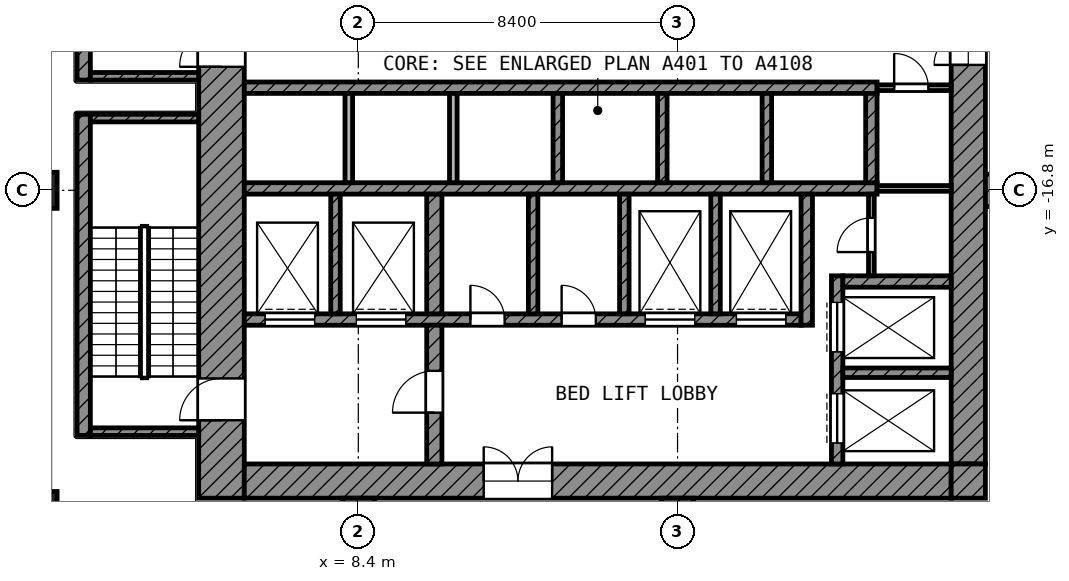
"""IFC4 building model, lengths in metres.
Left out: names, types, materials, properties, quantities, classifications, styles, units other than length and angle.
Written with IfcOpenShell. Run it as: python <this file> out.ifc"""

import sys

from ifc_helpers import new_model, si_unit, direction, frame, frame_2d, origin, origin_2d, place, context, subcontext, project, spatial, rectangle, extrude, element, fill, save


model = new_model("IFC4")
c1 = context("Model", 3, precision=1e-05, world=origin(), true_north=direction((0.0, 1.0)))
c2 = subcontext(c1, "Body", "Model", "MODEL_VIEW")
j1 = project(units=[si_unit("LENGTHUNIT", "METRE"), si_unit("PLANEANGLEUNIT", "RADIAN")], contexts=[c1])
p1 = place(None, origin())
s1 = spatial("IfcSite", under=j1, at=p1, CompositionType="ELEMENT")
p2 = place(p1, origin())
s2 = spatial("IfcBuilding", under=s1, at=p2, CompositionType="ELEMENT")
p3 = place(p2, frame((0.0, 0.0, 153.4)))
s3 = spatial("IfcBuildingStorey", under=s2, at=p3, CompositionType="ELEMENT", Elevation=153.4)
for number, where, z_axis, x_axis in (
    (1, (0.0, -16.8, 0.0), (0.0, 0.0, 1.0), (1.0, 0.0, 0.0)),
    (2, (0.0, -25.2, 0.0), (0.0, 0.0, 1.0), (1.0, 0.0, 0.0)),
):
    element("IfcColumn", number, at=place(p3, frame(where, z_axis=z_axis, x_axis=x_axis)), inside=s3, PredefinedType="COLUMN", context=c2, shape_type="SweptSolid", body=[
        extrude(rectangle(XDim=0.95, YDim=0.95, at=origin_2d()), origin(), (0.0, 0.0, 1.0), 5.0),
    ])
for number, where, z_axis, x_axis in (
    (3, (24.9, -16.8, 0.0), (0.0, 0.0, 1.0), (1.0, 0.0, 0.0)),
    (4, (8.4, -24.9, 0.0), (0.0, 0.0, 1.0), (0.0, -1.0, 0.0)),
    (5, (16.8, -24.9, 0.0), (0.0, 0.0, 1.0), (0.0, -1.0, 0.0)),
):
    element("IfcWall", number, at=place(p3, frame(where, z_axis=z_axis, x_axis=x_axis)), inside=s3, PredefinedType="SHEAR", context=c2, shape_type="SweptSolid", body=[
        extrude(rectangle(XDim=8.2, YDim=0.85, at=frame_2d((4.1, 0.0))), origin(), (0.0, 0.0, 1.0), 4.4),
    ])
p4 = place(p3, frame((4.8, -24.9, 0.0), z_axis=(0.0, 0.0, 1.0), x_axis=(0.0, 1.0, 0.0)))
e6 = element("IfcWall", 6, at=p4, inside=s3, PredefinedType="SHEAR", context=c2, shape_type="SweptSolid", body=[
    extrude(rectangle(XDim=19.5, YDim=1.2, at=frame_2d((9.75, 0.0))), origin(), (0.0, 0.0, 1.0), 4.4),
])
p5 = place(p4, frame((11.35, 0.0, 0.0)))
e7 = element("IfcOpeningElement", 7, at=p5, cuts=e6, PredefinedType="OPENING", context=c2, shape_type="SweptSolid", body=[
    extrude(rectangle(XDim=1.1, YDim=2.1, at=frame_2d((0.55, 1.05))), frame((0.0, 0.61, 0.0), z_axis=(0.0, -1.0, 0.0), x_axis=(1.0, 0.0, 0.0)), (0.0, 0.0, 1.0), 1.22),
])
p6 = place(p4, frame((2.05, 0.0, 0.0)))
e8 = element("IfcOpeningElement", 8, at=p6, cuts=e6, PredefinedType="OPENING", context=c2, shape_type="SweptSolid", body=[
    extrude(rectangle(XDim=1.1, YDim=2.1, at=frame_2d((0.55, 1.05))), frame((0.0, 0.61, 0.0), z_axis=(0.0, -1.0, 0.0), x_axis=(1.0, 0.0, 0.0)), (0.0, 0.0, 1.0), 1.22),
])
p7 = place(p3, frame((24.45, -24.0, 0.0), z_axis=(0.0, 0.0, 1.0), x_axis=(0.0, 1.0, 0.0)))
e9 = element("IfcWall", 9, at=p7, inside=s3, PredefinedType="SHEAR", context=c2, shape_type="SweptSolid", body=[
    extrude(rectangle(XDim=18.6, YDim=0.9, at=frame_2d((9.3, 0.0))), origin(), (0.0, 0.0, 1.0), 4.4),
])
p8 = place(p7, frame((10.5, 0.0, 0.0)))
e10 = element("IfcOpeningElement", 10, at=p8, cuts=e9, PredefinedType="OPENING", context=c2, shape_type="SweptSolid", body=[
    extrude(rectangle(XDim=1.8, YDim=2.1, at=frame_2d((0.9, 1.05))), frame((0.0, 0.46, 0.0), z_axis=(0.0, -1.0, 0.0), x_axis=(1.0, 0.0, 0.0)), (0.0, 0.0, 1.0), 0.92),
])
p9 = place(p3, frame((5.4, -24.45, 0.0), z_axis=(0.0, 0.0, 1.0), x_axis=(1.0, 0.0, 0.0)))
e11 = element("IfcWall", 11, at=p9, inside=s3, PredefinedType="SHEAR", context=c2, shape_type="SweptSolid", body=[
    extrude(rectangle(XDim=18.6, YDim=0.9, at=frame_2d((9.3, 0.0))), origin(), (0.0, 0.0, 1.0), 4.4),
])
p10 = place(p9, frame((6.3, 0.0, 0.0)))
e12 = element("IfcOpeningElement", 12, at=p10, cuts=e11, PredefinedType="OPENING", context=c2, shape_type="SweptSolid", body=[
    extrude(rectangle(XDim=1.8, YDim=2.1, at=frame_2d((0.9, 1.05))), frame((0.0, 0.46, 0.0), z_axis=(0.0, -1.0, 0.0), x_axis=(1.0, 0.0, 0.0)), (0.0, 0.0, 1.0), 0.92),
])
p11 = place(p3, frame((24.45, -24.9, 0.0), z_axis=(0.0, 0.0, 1.0), x_axis=(0.0, 1.0, 0.0)))
e13 = element("IfcWall", 13, at=p11, inside=s3, PredefinedType="SHEAR", context=c2, shape_type="SweptSolid", body=[
    extrude(rectangle(XDim=0.9, YDim=0.9, at=frame_2d((0.45, 0.0))), origin(), (0.0, 0.0, 1.0), 4.4),
])
for number, where, z_axis, x_axis in (
    (14, (5.4, -14.1, 0.0), (0.0, 0.0, 1.0), (1.0, 0.0, 0.0)),
    (15, (5.4, -16.75, 0.0), (0.0, 0.0, 1.0), (1.0, 0.0, 0.0)),
):
    element("IfcWall", number, at=place(p3, frame(where, z_axis=z_axis, x_axis=x_axis)), inside=s3, PredefinedType="SHEAR", context=c2, shape_type="SweptSolid", body=[
        extrude(rectangle(XDim=16.65, YDim=0.3, at=frame_2d((8.325, 0.0))), origin(), (0.0, 0.0, 1.0), 4.4),
    ])
p12 = place(p3, frame((5.4, -20.2, 0.0), z_axis=(0.0, 0.0, 1.0), x_axis=(1.0, 0.0, 0.0)))
e16 = element("IfcWall", 16, at=p12, inside=s3, PredefinedType="SHEAR", context=c2, shape_type="SweptSolid", body=[
    extrude(rectangle(XDim=14.65, YDim=0.3, at=frame_2d((7.325, 0.0))), origin(), (0.0, 0.0, 1.0), 4.4),
])
p13 = place(p12, frame((10.55, 0.0, 0.0)))
e17 = element("IfcOpeningElement", 17, at=p13, cuts=e16, PredefinedType="OPENING", context=c2, shape_type="SweptSolid", body=[
    extrude(rectangle(XDim=1.3, YDim=2.1, at=frame_2d((0.65, 1.05))), frame((0.0, 0.16, 0.0), z_axis=(0.0, -1.0, 0.0), x_axis=(1.0, 0.0, 0.0)), (0.0, 0.0, 1.0), 0.32),
])
p14 = place(p12, frame((12.95, 0.0, 0.0)))
e18 = element("IfcOpeningElement", 18, at=p14, cuts=e16, PredefinedType="OPENING", context=c2, shape_type="SweptSolid", body=[
    extrude(rectangle(XDim=1.3, YDim=2.1, at=frame_2d((0.65, 1.05))), frame((0.0, 0.16, 0.0), z_axis=(0.0, -1.0, 0.0), x_axis=(1.0, 0.0, 0.0)), (0.0, 0.0, 1.0), 0.32),
])
p15 = place(p12, frame((0.55, 0.0, 0.0)))
e19 = element("IfcOpeningElement", 19, at=p15, cuts=e16, PredefinedType="OPENING", context=c2, shape_type="SweptSolid", body=[
    extrude(rectangle(XDim=1.3, YDim=2.1, at=frame_2d((0.65, 1.05))), frame((0.0, 0.16, 0.0), z_axis=(0.0, -1.0, 0.0), x_axis=(1.0, 0.0, 0.0)), (0.0, 0.0, 1.0), 0.32),
])
p16 = place(p12, frame((2.95, 0.0, 0.0)))
e20 = element("IfcOpeningElement", 20, at=p16, cuts=e16, PredefinedType="OPENING", context=c2, shape_type="SweptSolid", body=[
    extrude(rectangle(XDim=1.3, YDim=2.1, at=frame_2d((0.65, 1.05))), frame((0.0, 0.16, 0.0), z_axis=(0.0, -1.0, 0.0), x_axis=(1.0, 0.0, 0.0)), (0.0, 0.0, 1.0), 0.32),
])
p17 = place(p12, frame((5.95, 0.0, 0.0)))
e21 = element("IfcOpeningElement", 21, at=p17, cuts=e16, PredefinedType="OPENING", context=c2, shape_type="SweptSolid", body=[
    extrude(rectangle(XDim=0.9, YDim=2.1, at=frame_2d((0.45, 1.05))), frame((0.0, 0.16, 0.0), z_axis=(0.0, -1.0, 0.0), x_axis=(1.0, 0.0, 0.0)), (0.0, 0.0, 1.0), 0.32),
])
p18 = place(p12, frame((8.35, 0.0, 0.0)))
e22 = element("IfcOpeningElement", 22, at=p18, cuts=e16, PredefinedType="OPENING", context=c2, shape_type="SweptSolid", body=[
    extrude(rectangle(XDim=0.9, YDim=2.1, at=frame_2d((0.45, 1.05))), frame((0.0, 0.16, 0.0), z_axis=(0.0, -1.0, 0.0), x_axis=(1.0, 0.0, 0.0)), (0.0, 0.0, 1.0), 0.32),
])
p19 = place(p3, frame((10.4, -24.0, 0.0), z_axis=(0.0, 0.0, 1.0), x_axis=(0.0, 1.0, 0.0)))
e23 = element("IfcWall", 23, at=p19, inside=s3, PredefinedType="SHEAR", context=c2, shape_type="SweptSolid", body=[
    extrude(rectangle(XDim=3.65, YDim=0.4, at=frame_2d((1.825, 0.0))), origin(), (0.0, 0.0, 1.0), 4.4),
])
p20 = place(p19, frame((1.35, 0.0, 0.0)))
e24 = element("IfcOpeningElement", 24, at=p20, cuts=e23, PredefinedType="OPENING", context=c2, shape_type="SweptSolid", body=[
    extrude(rectangle(XDim=1.1, YDim=2.1, at=frame_2d((0.55, 1.05))), frame((0.0, 0.21, 0.0), z_axis=(0.0, -1.0, 0.0), x_axis=(1.0, 0.0, 0.0)), (0.0, 0.0, 1.0), 0.42),
])
p21 = place(p3, frame((10.4, -20.05, 0.0), z_axis=(0.0, 0.0, 1.0), x_axis=(0.0, 1.0, 0.0)))
e25 = element("IfcWall", 25, at=p21, inside=s3, PredefinedType="SHEAR", context=c2, shape_type="SweptSolid", body=[
    extrude(rectangle(XDim=3.15, YDim=0.4, at=frame_2d((1.575, 0.0))), origin(), (0.0, 0.0, 1.0), 4.4),
])
p22 = place(p3, frame((20.2, -20.35, 0.0), z_axis=(0.0, 0.0, 1.0), x_axis=(0.0, 1.0, 0.0)))
e26 = element("IfcWall", 26, at=p22, inside=s3, PredefinedType="SHEAR", context=c2, shape_type="SweptSolid", body=[
    extrude(rectangle(XDim=3.45, YDim=0.3, at=frame_2d((1.725, 0.0))), origin(), (0.0, 0.0, 1.0), 4.4),
])
p23 = place(p3, frame((21.9, -16.6, 0.0), z_axis=(0.0, 0.0, 1.0), x_axis=(0.0, 1.0, 0.0)))
e27 = element("IfcWall", 27, at=p23, inside=s3, PredefinedType="SHEAR", context=c2, shape_type="SweptSolid", body=[
    extrude(rectangle(XDim=2.35, YDim=0.3, at=frame_2d((1.175, 0.0))), origin(), (0.0, 0.0, 1.0), 4.4),
])
p24 = place(p3, frame((21.15, -19.2, 0.0), z_axis=(0.0, 0.0, 1.0), x_axis=(1.0, 0.0, 0.0)))
e28 = element("IfcWall", 28, at=p24, inside=s3, PredefinedType="SHEAR", context=c2, shape_type="SweptSolid", body=[
    extrude(rectangle(XDim=2.85, YDim=0.3, at=frame_2d((1.425, 0.0))), origin(), (0.0, 0.0, 1.0), 4.4),
])
p25 = place(p3, frame((21.0, -24.0, 0.0), z_axis=(0.0, 0.0, 1.0), x_axis=(0.0, 1.0, 0.0)))
e29 = element("IfcWall", 29, at=p25, inside=s3, PredefinedType="SHEAR", context=c2, shape_type="SweptSolid", body=[
    extrude(rectangle(XDim=4.95, YDim=0.3, at=frame_2d((2.475, 0.0))), origin(), (0.0, 0.0, 1.0), 4.4),
])
p26 = place(p25, frame((2.95, 0.0, 0.0)))
e30 = element("IfcOpeningElement", 30, at=p26, cuts=e29, PredefinedType="OPENING", context=c2, shape_type="SweptSolid", body=[
    extrude(rectangle(XDim=1.3, YDim=2.1, at=frame_2d((0.65, 1.05))), frame((0.0, 0.16, 0.0), z_axis=(0.0, -1.0, 0.0), x_axis=(1.0, 0.0, 0.0)), (0.0, 0.0, 1.0), 0.32),
])
p27 = place(p25, frame((0.55, 0.0, 0.0)))
e31 = element("IfcOpeningElement", 31, at=p27, cuts=e29, PredefinedType="OPENING", context=c2, shape_type="SweptSolid", body=[
    extrude(rectangle(XDim=1.3, YDim=2.1, at=frame_2d((0.65, 1.05))), frame((0.0, 0.16, 0.0), z_axis=(0.0, -1.0, 0.0), x_axis=(1.0, 0.0, 0.0)), (0.0, 0.0, 1.0), 0.32),
])
p28 = place(p3, frame((21.15, -21.6, 0.0), z_axis=(0.0, 0.0, 1.0), x_axis=(1.0, 0.0, 0.0)))
e32 = element("IfcWall", 32, at=p28, inside=s3, PredefinedType="SHEAR", context=c2, shape_type="SweptSolid", body=[
    extrude(rectangle(XDim=2.85, YDim=0.25, at=frame_2d((1.425, 0.0))), origin(), (0.0, 0.0, 1.0), 4.4),
])
for number, where, z_axis, x_axis in (
    (33, (7.8, -20.05, 0.0), (0.0, 0.0, 1.0), (0.0, 1.0, 0.0)),
    (34, (13.0, -20.05, 0.0), (0.0, 0.0, 1.0), (0.0, 1.0, 0.0)),
    (35, (15.4, -20.05, 0.0), (0.0, 0.0, 1.0), (0.0, 1.0, 0.0)),
    (36, (17.8, -20.05, 0.0), (0.0, 0.0, 1.0), (0.0, 1.0, 0.0)),
):
    element("IfcWall", number, at=place(p3, frame(where, z_axis=z_axis, x_axis=x_axis)), inside=s3, PredefinedType="SHEAR", context=c2, shape_type="SweptSolid", body=[
        extrude(rectangle(XDim=3.15, YDim=0.25, at=frame_2d((1.575, 0.0))), origin(), (0.0, 0.0, 1.0), 4.4),
    ])
for number, where, z_axis, x_axis in (
    (37, (8.15, -16.6, 0.0), (0.0, 0.0, 1.0), (0.0, 1.0, 0.0)),
    (38, (10.9, -16.6, 0.0), (0.0, 0.0, 1.0), (0.0, 1.0, 0.0)),
):
    element("IfcWall", number, at=place(p3, frame(where, z_axis=z_axis, x_axis=x_axis)), inside=s3, PredefinedType="PARTITIONING", context=c2, shape_type="SweptSolid", body=[
        extrude(rectangle(XDim=2.35, YDim=0.2, at=frame_2d((1.175, 0.0))), origin(), (0.0, 0.0, 1.0), 4.4),
    ])
for number, where, z_axis, x_axis in (
    (39, (13.65, -16.6, 0.0), (0.0, 0.0, 1.0), (0.0, 1.0, 0.0)),
    (40, (16.4, -16.6, 0.0), (0.0, 0.0, 1.0), (0.0, 1.0, 0.0)),
    (41, (19.15, -16.6, 0.0), (0.0, 0.0, 1.0), (0.0, 1.0, 0.0)),
):
    element("IfcWall", number, at=place(p3, frame(where, z_axis=z_axis, x_axis=x_axis)), inside=s3, PredefinedType="SHEAR", context=c2, shape_type="SweptSolid", body=[
        extrude(rectangle(XDim=2.35, YDim=0.25, at=frame_2d((1.175, 0.0))), origin(), (0.0, 0.0, 1.0), 4.4),
    ])
p29 = place(p3, frame((21.9, -19.05, 0.0), z_axis=(0.0, 0.0, 1.0), x_axis=(0.0, 1.0, 0.0)))
e42 = element("IfcWall", 42, at=p29, inside=s3, PredefinedType="PARTITIONING", context=c2, shape_type="SweptSolid", body=[
    extrude(rectangle(XDim=2.15, YDim=0.15, at=frame_2d((1.075, 0.0))), origin(), (0.0, 0.0, 1.0), 4.4),
])
p30 = place(p29, frame((0.625, 0.0, 0.0)))
e43 = element("IfcOpeningElement", 43, at=p30, cuts=e42, PredefinedType="OPENING", context=c2, shape_type="SweptSolid", body=[
    extrude(rectangle(XDim=0.9, YDim=2.1, at=frame_2d((0.45, 1.05))), frame((0.0, 0.085, 0.0), z_axis=(0.0, -1.0, 0.0), x_axis=(1.0, 0.0, 0.0)), (0.0, 0.0, 1.0), 0.17),
])
p31 = place(p3, frame((22.05, -16.75, 0.0), z_axis=(0.0, 0.0, 1.0), x_axis=(1.0, 0.0, 0.0)))
e44 = element("IfcWall", 44, at=p31, inside=s3, PredefinedType="PARTITIONING", context=c2, shape_type="SweptSolid", body=[
    extrude(rectangle(XDim=1.95, YDim=0.15, at=frame_2d((0.975, 0.0))), origin(), (0.0, 0.0, 1.0), 4.4),
])
p32 = place(p3, frame((22.05, -14.1, 0.0), z_axis=(0.0, 0.0, 1.0), x_axis=(1.0, 0.0, 0.0)))
e45 = element("IfcWall", 45, at=p32, inside=s3, PredefinedType="PARTITIONING", context=c2, shape_type="SweptSolid", body=[
    extrude(rectangle(XDim=1.95, YDim=0.15, at=frame_2d((0.975, 0.0))), origin(), (0.0, 0.0, 1.0), 4.4),
])
p33 = place(p32, frame((0.45, 0.0, 0.0)))
e46 = element("IfcOpeningElement", 46, at=p33, cuts=e45, PredefinedType="OPENING", context=c2, shape_type="SweptSolid", body=[
    extrude(rectangle(XDim=0.9, YDim=2.1, at=frame_2d((0.45, 1.05))), frame((0.0, 0.085, 0.0), z_axis=(0.0, -1.0, 0.0), x_axis=(1.0, 0.0, 0.0)), (0.0, 0.0, 1.0), 0.17),
])
p34 = place(p3, frame((1.175, -13.9, 0.0), z_axis=(0.0, 0.0, 1.0), x_axis=(0.0, 1.0, 0.0)))
e47 = element("IfcWall", 47, at=p34, inside=s3, PredefinedType="SHEAR", context=c2, shape_type="SweptSolid", body=[
    extrude(rectangle(XDim=8.45, YDim=0.35, at=frame_2d((4.225, 0.0))), origin(), (0.0, 0.0, 1.0), 4.4),
])
p35 = place(p3, frame((1.35, -13.8, 0.0), z_axis=(0.0, 0.0, 1.0), x_axis=(1.0, 0.0, 0.0)))
e48 = element("IfcWall", 48, at=p35, inside=s3, PredefinedType="SHEAR", context=c2, shape_type="SweptSolid", body=[
    extrude(rectangle(XDim=2.85, YDim=0.2, at=frame_2d((1.425, 0.0))), origin(), (0.0, 0.0, 1.0), 4.4),
])
p36 = place(p3, frame((1.175, -23.25, 0.0), z_axis=(0.0, 0.0, 1.0), x_axis=(0.0, 1.0, 0.0)))
e49 = element("IfcWall", 49, at=p36, inside=s3, PredefinedType="SHEAR", context=c2, shape_type="SweptSolid", body=[
    extrude(rectangle(XDim=8.45, YDim=0.35, at=frame_2d((4.225, 0.0))), origin(), (0.0, 0.0, 1.0), 4.4),
])
for number, where, z_axis, x_axis in (
    (50, (1.35, -14.9, 0.0), (0.0, 0.0, 1.0), (1.0, 0.0, 0.0)),
    (51, (1.35, -23.15, 0.0), (0.0, 0.0, 1.0), (1.0, 0.0, 0.0)),
):
    element("IfcWall", number, at=place(p3, frame(where, z_axis=z_axis, x_axis=x_axis)), inside=s3, PredefinedType="SHEAR", context=c2, shape_type="SweptSolid", body=[
        extrude(rectangle(XDim=2.85, YDim=0.2, at=frame_2d((1.425, 0.0))), origin(), (0.0, 0.0, 1.0), 4.4),
    ])
p37 = place(p26, origin())
e52 = element("IfcDoor", 52, at=p37, inside=s3, OperationType="DOUBLE_DOOR_SLIDING", PredefinedType="DOOR", context=c2, shape_type="SweptSolid", body=[
    extrude(rectangle(XDim=1.3, YDim=2.1, at=frame_2d((0.65, 1.05))), frame((0.0, 0.025, 0.0), z_axis=(0.0, -1.0, 0.0), x_axis=(1.0, 0.0, 0.0)), (0.0, 0.0, 1.0), 0.05),
])
fill(e30, e52)
p38 = place(p27, origin())
e53 = element("IfcDoor", 53, at=p38, inside=s3, OperationType="DOUBLE_DOOR_SLIDING", PredefinedType="DOOR", context=c2, shape_type="SweptSolid", body=[
    extrude(rectangle(XDim=1.3, YDim=2.1, at=frame_2d((0.65, 1.05))), frame((0.0, 0.025, 0.0), z_axis=(0.0, -1.0, 0.0), x_axis=(1.0, 0.0, 0.0)), (0.0, 0.0, 1.0), 0.05),
])
fill(e31, e53)
p39 = place(p13, origin())
e54 = element("IfcDoor", 54, at=p39, inside=s3, OperationType="DOUBLE_DOOR_SLIDING", PredefinedType="DOOR", context=c2, shape_type="SweptSolid", body=[
    extrude(rectangle(XDim=1.3, YDim=2.1, at=frame_2d((0.65, 1.05))), frame((0.0, 0.025, 0.0), z_axis=(0.0, -1.0, 0.0), x_axis=(1.0, 0.0, 0.0)), (0.0, 0.0, 1.0), 0.05),
])
fill(e17, e54)
p40 = place(p14, origin())
e55 = element("IfcDoor", 55, at=p40, inside=s3, OperationType="DOUBLE_DOOR_SLIDING", PredefinedType="DOOR", context=c2, shape_type="SweptSolid", body=[
    extrude(rectangle(XDim=1.3, YDim=2.1, at=frame_2d((0.65, 1.05))), frame((0.0, 0.025, 0.0), z_axis=(0.0, -1.0, 0.0), x_axis=(1.0, 0.0, 0.0)), (0.0, 0.0, 1.0), 0.05),
])
fill(e18, e55)
p41 = place(p15, origin())
e56 = element("IfcDoor", 56, at=p41, inside=s3, OperationType="DOUBLE_DOOR_SLIDING", PredefinedType="DOOR", context=c2, shape_type="SweptSolid", body=[
    extrude(rectangle(XDim=1.3, YDim=2.1, at=frame_2d((0.65, 1.05))), frame((0.0, 0.025, 0.0), z_axis=(0.0, -1.0, 0.0), x_axis=(1.0, 0.0, 0.0)), (0.0, 0.0, 1.0), 0.05),
])
fill(e19, e56)
p42 = place(p16, origin())
e57 = element("IfcDoor", 57, at=p42, inside=s3, OperationType="DOUBLE_DOOR_SLIDING", PredefinedType="DOOR", context=c2, shape_type="SweptSolid", body=[
    extrude(rectangle(XDim=1.3, YDim=2.1, at=frame_2d((0.65, 1.05))), frame((0.0, 0.025, 0.0), z_axis=(0.0, -1.0, 0.0), x_axis=(1.0, 0.0, 0.0)), (0.0, 0.0, 1.0), 0.05),
])
fill(e20, e57)
p43 = place(p5, origin())
e58 = element("IfcDoor", 58, at=p43, inside=s3, OperationType="SINGLE_SWING_LEFT", PredefinedType="DOOR", context=c2, shape_type="SweptSolid", body=[
    extrude(rectangle(XDim=1.1, YDim=2.1, at=frame_2d((0.55, 1.05))), frame((0.0, 0.025, 0.0), z_axis=(0.0, -1.0, 0.0), x_axis=(1.0, 0.0, 0.0)), (0.0, 0.0, 1.0), 0.05),
])
fill(e7, e58)
p44 = place(p6, origin())
e59 = element("IfcDoor", 59, at=p44, inside=s3, OperationType="SINGLE_SWING_LEFT", PredefinedType="DOOR", context=c2, shape_type="SweptSolid", body=[
    extrude(rectangle(XDim=1.1, YDim=2.1, at=frame_2d((0.55, 1.05))), frame((0.0, 0.025, 0.0), z_axis=(0.0, -1.0, 0.0), x_axis=(1.0, 0.0, 0.0)), (0.0, 0.0, 1.0), 0.05),
])
fill(e8, e59)
p45 = place(p20, origin())
e60 = element("IfcDoor", 60, at=p45, inside=s3, OperationType="SINGLE_SWING_LEFT", PredefinedType="DOOR", context=c2, shape_type="SweptSolid", body=[
    extrude(rectangle(XDim=1.1, YDim=2.1, at=frame_2d((0.55, 1.05))), frame((0.0, 0.025, 0.0), z_axis=(0.0, -1.0, 0.0), x_axis=(1.0, 0.0, 0.0)), (0.0, 0.0, 1.0), 0.05),
])
fill(e24, e60)
p46 = place(p8, origin())
e61 = element("IfcDoor", 61, at=p46, inside=s3, OperationType="DOUBLE_DOOR_SINGLE_SWING", PredefinedType="DOOR", context=c2, shape_type="SweptSolid", body=[
    extrude(rectangle(XDim=1.8, YDim=2.1, at=frame_2d((0.9, 1.05))), frame((0.0, 0.025, 0.0), z_axis=(0.0, -1.0, 0.0), x_axis=(1.0, 0.0, 0.0)), (0.0, 0.0, 1.0), 0.05),
])
fill(e10, e61)
p47 = place(p10, origin())
e62 = element("IfcDoor", 62, at=p47, inside=s3, OperationType="DOUBLE_DOOR_SINGLE_SWING", PredefinedType="DOOR", context=c2, shape_type="SweptSolid", body=[
    extrude(rectangle(XDim=1.8, YDim=2.1, at=frame_2d((0.9, 1.05))), frame((0.0, 0.025, 0.0), z_axis=(0.0, -1.0, 0.0), x_axis=(1.0, 0.0, 0.0)), (0.0, 0.0, 1.0), 0.05),
])
fill(e12, e62)
p48 = place(p33, origin())
e63 = element("IfcDoor", 63, at=p48, inside=s3, OperationType="SINGLE_SWING_LEFT", PredefinedType="DOOR", context=c2, shape_type="SweptSolid", body=[
    extrude(rectangle(XDim=0.9, YDim=2.1, at=frame_2d((0.45, 1.05))), frame((0.0, 0.025, 0.0), z_axis=(0.0, -1.0, 0.0), x_axis=(1.0, 0.0, 0.0)), (0.0, 0.0, 1.0), 0.05),
])
fill(e46, e63)
p49 = place(p30, origin())
e64 = element("IfcDoor", 64, at=p49, inside=s3, OperationType="SINGLE_SWING_LEFT", PredefinedType="DOOR", context=c2, shape_type="SweptSolid", body=[
    extrude(rectangle(XDim=0.9, YDim=2.1, at=frame_2d((0.45, 1.05))), frame((0.0, 0.025, 0.0), z_axis=(0.0, -1.0, 0.0), x_axis=(1.0, 0.0, 0.0)), (0.0, 0.0, 1.0), 0.05),
])
fill(e43, e64)
p50 = place(p17, origin())
e65 = element("IfcDoor", 65, at=p50, inside=s3, OperationType="SINGLE_SWING_LEFT", PredefinedType="DOOR", context=c2, shape_type="SweptSolid", body=[
    extrude(rectangle(XDim=0.9, YDim=2.1, at=frame_2d((0.45, 1.05))), frame((0.0, 0.025, 0.0), z_axis=(0.0, -1.0, 0.0), x_axis=(1.0, 0.0, 0.0)), (0.0, 0.0, 1.0), 0.05),
])
fill(e21, e65)
p51 = place(p18, origin())
e66 = element("IfcDoor", 66, at=p51, inside=s3, OperationType="SINGLE_SWING_LEFT", PredefinedType="DOOR", context=c2, shape_type="SweptSolid", body=[
    extrude(rectangle(XDim=0.9, YDim=2.1, at=frame_2d((0.45, 1.05))), frame((0.0, 0.025, 0.0), z_axis=(0.0, -1.0, 0.0), x_axis=(1.0, 0.0, 0.0)), (0.0, 0.0, 1.0), 0.05),
])
fill(e22, e66)
save(model, sys.argv[1])
